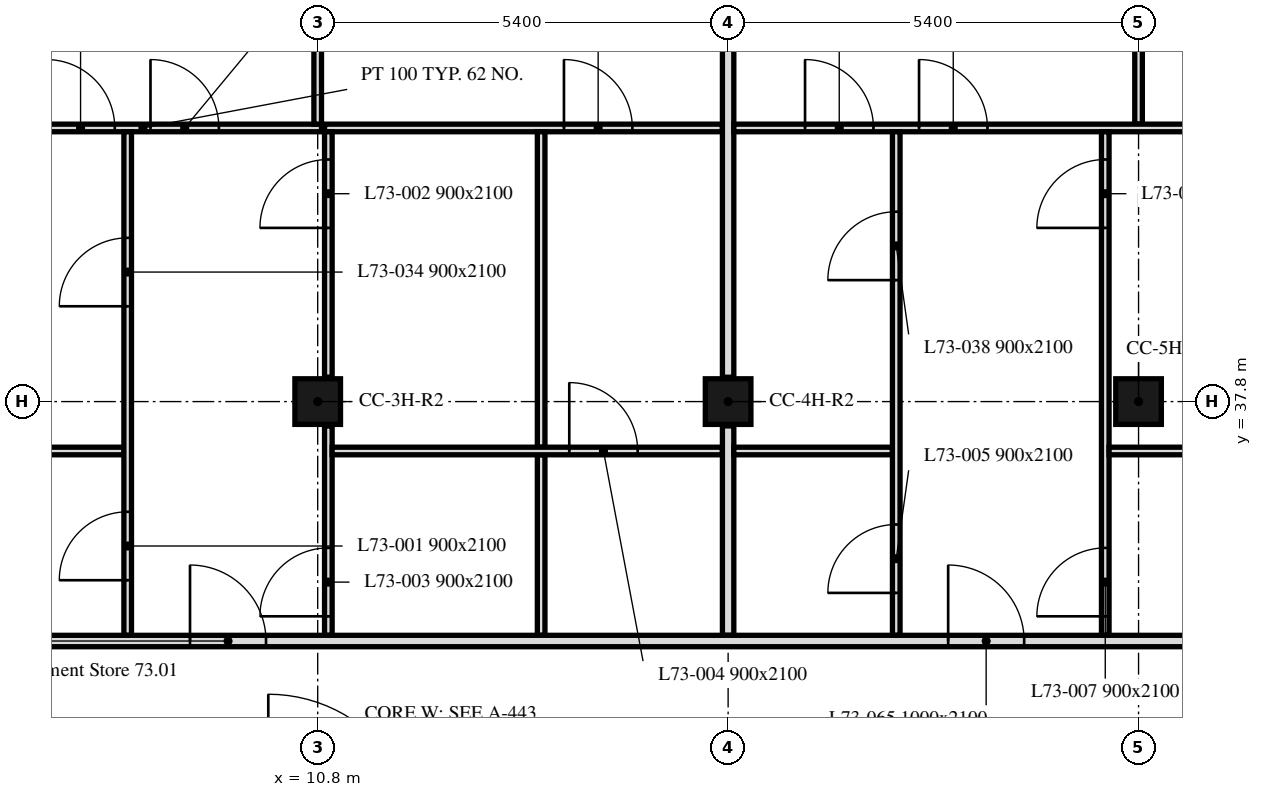
"""IFC4 building model, lengths in metres.
Left out: names, types, materials, properties, quantities, classifications, styles, units other than length and angle.
Written with IfcOpenShell. Run it as: python <this file> out.ifc"""

import sys

from ifc_helpers import new_model, si_unit, direction, frame, frame_2d, origin, origin_2d, place, context, subcontext, project, spatial, rectangle, extrude, element, fill, save


model = new_model("IFC4")
c1 = context("Model", 3, precision=1e-05, world=origin(), true_north=direction((0.0, 1.0)))
c2 = subcontext(c1, "Body", "Model", "MODEL_VIEW")
j1 = project(units=[si_unit("LENGTHUNIT", "METRE"), si_unit("PLANEANGLEUNIT", "RADIAN")], contexts=[c1])
p1 = place(None, origin())
s1 = spatial("IfcSite", under=j1, at=p1, CompositionType="ELEMENT")
p2 = place(p1, origin())
s2 = spatial("IfcBuilding", under=s1, at=p2, CompositionType="ELEMENT")
p3 = place(p2, frame((0.0, 0.0, 295.0)))
s3 = spatial("IfcBuildingStorey", under=s2, at=p3, CompositionType="ELEMENT", Elevation=295.0)
for number, where, z_axis, x_axis in (
    (1, (10.8, 37.8, 0.0), (0.0, 0.0, 1.0), (1.0, 0.0, 0.0)),
    (2, (16.2, 37.8, 0.0), (0.0, 0.0, 1.0), (1.0, 0.0, 0.0)),
    (3, (21.6, 37.8, 0.0), (0.0, 0.0, 1.0), (1.0, 0.0, 0.0)),
):
    element("IfcColumn", number, at=place(p3, frame(where, z_axis=z_axis, x_axis=x_axis)), inside=s3, PredefinedType="COLUMN", context=c2, shape_type="SweptSolid", body=[
        extrude(rectangle(XDim=0.6, YDim=0.6, at=origin_2d()), origin(), (0.0, 0.0, 1.0), 3.0),
    ])
p4 = place(p3, frame((6.151, 41.4, 0.0), z_axis=(0.0, 0.0, 1.0), x_axis=(1.0, 0.0, 0.0)))
e4 = element("IfcWall", 4, at=p4, inside=s3, PredefinedType="PARTITIONING", context=c2, shape_type="SweptSolid", body=[
    extrude(rectangle(XDim=4.699, YDim=0.1, at=frame_2d((2.35, 0.0))), origin(), (0.0, 0.0, 1.0), 3.0),
])
p5 = place(p4, frame((1.079, 0.0, 0.0)))
e5 = element("IfcOpeningElement", 5, at=p5, cuts=e4, PredefinedType="OPENING", context=c2, shape_type="SweptSolid", body=[
    extrude(rectangle(XDim=0.9, YDim=2.1, at=frame_2d((0.45, 1.05))), frame((0.0, 0.05, 0.0), z_axis=(0.0, -1.0, 0.0), x_axis=(1.0, 0.0, 0.0)), (0.0, 0.0, 1.0), 0.1),
])
p6 = place(p4, frame((2.449, 0.0, 0.0)))
e6 = element("IfcOpeningElement", 6, at=p6, cuts=e4, PredefinedType="OPENING", context=c2, shape_type="SweptSolid", body=[
    extrude(rectangle(XDim=0.9, YDim=2.1, at=frame_2d((0.45, 1.05))), frame((0.0, 0.05, 0.0), z_axis=(0.0, -1.0, 0.0), x_axis=(1.0, 0.0, 0.0)), (0.0, 0.0, 1.0), 0.1),
])
p7 = place(p3, frame((10.8, 41.45, 0.0), z_axis=(0.0, 0.0, 1.0), x_axis=(0.0, 1.0, 0.0)))
e7 = element("IfcWall", 7, at=p7, inside=s3, PredefinedType="PARTITIONING", context=c2, shape_type="SweptSolid", body=[
    extrude(rectangle(XDim=1.43, YDim=0.1, at=frame_2d((0.715, 0.0))), origin(), (0.0, 0.0, 1.0), 3.0),
])
p8 = place(p3, frame((10.89, 41.4, 0.0), z_axis=(0.0, 0.0, 1.0), x_axis=(1.0, 0.0, 0.0)))
e8 = element("IfcWall", 8, at=p8, inside=s3, PredefinedType="PARTITIONING", context=c2, shape_type="SweptSolid", body=[
    extrude(rectangle(XDim=5.235, YDim=0.1, at=frame_2d((2.618, 0.0))), origin(), (0.0, 0.0, 1.0), 3.0),
])
p9 = place(p8, frame((3.15, 0.0, 0.0)))
e9 = element("IfcOpeningElement", 9, at=p9, cuts=e8, PredefinedType="OPENING", context=c2, shape_type="SweptSolid", body=[
    extrude(rectangle(XDim=0.9, YDim=2.1, at=frame_2d((0.45, 1.05))), frame((0.0, 0.05, 0.0), z_axis=(0.0, -1.0, 0.0), x_axis=(1.0, 0.0, 0.0)), (0.0, 0.0, 1.0), 0.1),
])
p10 = place(p3, frame((6.151, 37.15, 0.0), z_axis=(0.0, 0.0, 1.0), x_axis=(1.0, 0.0, 0.0)))
e10 = element("IfcWall", 10, at=p10, inside=s3, PredefinedType="PARTITIONING", context=c2, shape_type="SweptSolid", body=[
    extrude(rectangle(XDim=2.099, YDim=0.1, at=frame_2d((1.05, 0.0))), origin(), (0.0, 0.0, 1.0), 3.0),
])
p11 = place(p3, frame((8.3, 34.725, 0.0), z_axis=(0.0, 0.0, 1.0), x_axis=(0.0, 1.0, 0.0)))
e11 = element("IfcWall", 11, at=p11, inside=s3, PredefinedType="PARTITIONING", context=c2, shape_type="SweptSolid", body=[
    extrude(rectangle(XDim=6.625, YDim=0.1, at=frame_2d((3.312, 0.0))), origin(), (0.0, 0.0, 1.0), 3.0),
])
p12 = place(p11, frame((0.725, 0.0, 0.0)))
e12 = element("IfcOpeningElement", 12, at=p12, cuts=e11, PredefinedType="OPENING", context=c2, shape_type="SweptSolid", body=[
    extrude(rectangle(XDim=0.9, YDim=2.1, at=frame_2d((0.45, 1.05))), frame((0.0, 0.05, 0.0), z_axis=(0.0, -1.0, 0.0), x_axis=(1.0, 0.0, 0.0)), (0.0, 0.0, 1.0), 0.1),
])
p13 = place(p11, frame((4.329, 0.0, 0.0)))
e13 = element("IfcOpeningElement", 13, at=p13, cuts=e11, PredefinedType="OPENING", context=c2, shape_type="SweptSolid", body=[
    extrude(rectangle(XDim=0.9, YDim=2.1, at=frame_2d((0.45, 1.05))), frame((0.0, 0.05, 0.0), z_axis=(0.0, -1.0, 0.0), x_axis=(1.0, 0.0, 0.0)), (0.0, 0.0, 1.0), 0.1),
])
p14 = place(p3, frame((10.94, 34.725, 0.0), z_axis=(0.0, 0.0, 1.0), x_axis=(0.0, 1.0, 0.0)))
e14 = element("IfcWall", 14, at=p14, inside=s3, PredefinedType="PARTITIONING", context=c2, shape_type="SweptSolid", body=[
    extrude(rectangle(XDim=2.755, YDim=0.1, at=frame_2d((1.377, 0.0))), origin(), (0.0, 0.0, 1.0), 3.0),
])
p15 = place(p14, frame((0.25, 0.0, 0.0)))
e15 = element("IfcOpeningElement", 15, at=p15, cuts=e14, PredefinedType="OPENING", context=c2, shape_type="SweptSolid", body=[
    extrude(rectangle(XDim=0.9, YDim=2.1, at=frame_2d((0.45, 1.05))), frame((0.0, 0.05, 0.0), z_axis=(0.0, -1.0, 0.0), x_axis=(1.0, 0.0, 0.0)), (0.0, 0.0, 1.0), 0.1),
])
p16 = place(p3, frame((10.94, 38.12, 0.0), z_axis=(0.0, 0.0, 1.0), x_axis=(0.0, 1.0, 0.0)))
e16 = element("IfcWall", 16, at=p16, inside=s3, PredefinedType="PARTITIONING", context=c2, shape_type="SweptSolid", body=[
    extrude(rectangle(XDim=3.23, YDim=0.1, at=frame_2d((1.615, 0.0))), origin(), (0.0, 0.0, 1.0), 3.0),
])
p17 = place(p16, frame((1.965, 0.0, 0.0)))
e17 = element("IfcOpeningElement", 17, at=p17, cuts=e16, PredefinedType="OPENING", context=c2, shape_type="SweptSolid", body=[
    extrude(rectangle(XDim=0.9, YDim=2.1, at=frame_2d((0.45, 1.05))), frame((0.0, 0.05, 0.0), z_axis=(0.0, -1.0, 0.0), x_axis=(1.0, 0.0, 0.0)), (0.0, 0.0, 1.0), 0.1),
])
p18 = place(p3, frame((13.74, 37.2, 0.0), z_axis=(0.0, 0.0, 1.0), x_axis=(0.0, 1.0, 0.0)))
e18 = element("IfcWall", 18, at=p18, inside=s3, PredefinedType="PARTITIONING", context=c2, shape_type="SweptSolid", body=[
    extrude(rectangle(XDim=4.15, YDim=0.1, at=frame_2d((2.075, 0.0))), origin(), (0.0, 0.0, 1.0), 3.0),
])
p19 = place(p3, frame((13.74, 34.725, 0.0), z_axis=(0.0, 0.0, 1.0), x_axis=(0.0, 1.0, 0.0)))
e19 = element("IfcWall", 19, at=p19, inside=s3, PredefinedType="PARTITIONING", context=c2, shape_type="SweptSolid", body=[
    extrude(rectangle(XDim=2.375, YDim=0.1, at=frame_2d((1.188, 0.0))), origin(), (0.0, 0.0, 1.0), 3.0),
])
p20 = place(p3, frame((10.99, 37.15, 0.0), z_axis=(0.0, 0.0, 1.0), x_axis=(1.0, 0.0, 0.0)))
e20 = element("IfcWall", 20, at=p20, inside=s3, PredefinedType="PARTITIONING", context=c2, shape_type="SweptSolid", body=[
    extrude(rectangle(XDim=5.135, YDim=0.1, at=frame_2d((2.567, 0.0))), origin(), (0.0, 0.0, 1.0), 3.0),
])
p21 = place(p20, frame((3.12, 0.0, 0.0)))
e21 = element("IfcOpeningElement", 21, at=p21, cuts=e20, PredefinedType="OPENING", context=c2, shape_type="SweptSolid", body=[
    extrude(rectangle(XDim=0.9, YDim=2.1, at=frame_2d((0.45, 1.05))), frame((0.0, 0.05, 0.0), z_axis=(0.0, -1.0, 0.0), x_axis=(1.0, 0.0, 0.0)), (0.0, 0.0, 1.0), 0.1),
])
p22 = place(p3, frame((16.2, 38.12, 0.0), z_axis=(0.0, 0.0, 1.0), x_axis=(0.0, 1.0, 0.0)))
e22 = element("IfcWall", 22, at=p22, inside=s3, PredefinedType="PARTITIONING", context=c2, shape_type="SweptSolid", body=[
    extrude(rectangle(XDim=4.76, YDim=0.15, at=frame_2d((2.38, 0.0))), origin(), (0.0, 0.0, 1.0), 2.4),
])
p23 = place(p3, frame((16.2, 34.725, 0.0), z_axis=(0.0, 0.0, 1.0), x_axis=(0.0, 1.0, 0.0)))
e23 = element("IfcWall", 23, at=p23, inside=s3, PredefinedType="PARTITIONING", context=c2, shape_type="SweptSolid", body=[
    extrude(rectangle(XDim=2.755, YDim=0.15, at=frame_2d((1.377, 0.0))), origin(), (0.0, 0.0, 1.0), 2.4),
])
p24 = place(p3, frame((21.6, 41.45, 0.0), z_axis=(0.0, 0.0, 1.0), x_axis=(0.0, 1.0, 0.0)))
e24 = element("IfcWall", 24, at=p24, inside=s3, PredefinedType="PARTITIONING", context=c2, shape_type="SweptSolid", body=[
    extrude(rectangle(XDim=1.43, YDim=0.1, at=frame_2d((0.715, 0.0))), origin(), (0.0, 0.0, 1.0), 2.4),
])
p25 = place(p3, frame((16.275, 41.4, 0.0), z_axis=(0.0, 0.0, 1.0), x_axis=(1.0, 0.0, 0.0)))
e25 = element("IfcWall", 25, at=p25, inside=s3, PredefinedType="PARTITIONING", context=c2, shape_type="SweptSolid", body=[
    extrude(rectangle(XDim=10.65, YDim=0.1, at=frame_2d((5.325, 0.0))), origin(), (0.0, 0.0, 1.0), 2.4),
])
p26 = place(p25, frame((0.937, 0.0, 0.0)))
e26 = element("IfcOpeningElement", 26, at=p26, cuts=e25, PredefinedType="OPENING", context=c2, shape_type="SweptSolid", body=[
    extrude(rectangle(XDim=0.9, YDim=2.1, at=frame_2d((0.45, 1.05))), frame((0.0, 0.05, 0.0), z_axis=(0.0, -1.0, 0.0), x_axis=(1.0, 0.0, 0.0)), (0.0, 0.0, 1.0), 0.1),
])
p27 = place(p25, frame((8.075, 0.0, 0.0)))
e27 = element("IfcOpeningElement", 27, at=p27, cuts=e25, PredefinedType="OPENING", context=c2, shape_type="SweptSolid", body=[
    extrude(rectangle(XDim=0.9, YDim=2.1, at=frame_2d((0.45, 1.05))), frame((0.0, 0.05, 0.0), z_axis=(0.0, -1.0, 0.0), x_axis=(1.0, 0.0, 0.0)), (0.0, 0.0, 1.0), 0.1),
])
p28 = place(p25, frame((2.437, 0.0, 0.0)))
e28 = element("IfcOpeningElement", 28, at=p28, cuts=e25, PredefinedType="OPENING", context=c2, shape_type="SweptSolid", body=[
    extrude(rectangle(XDim=0.9, YDim=2.1, at=frame_2d((0.45, 1.05))), frame((0.0, 0.05, 0.0), z_axis=(0.0, -1.0, 0.0), x_axis=(1.0, 0.0, 0.0)), (0.0, 0.0, 1.0), 0.1),
])
p29 = place(p3, frame((16.275, 37.15, 0.0), z_axis=(0.0, 0.0, 1.0), x_axis=(1.0, 0.0, 0.0)))
e29 = element("IfcWall", 29, at=p29, inside=s3, PredefinedType="PARTITIONING", context=c2, shape_type="SweptSolid", body=[
    extrude(rectangle(XDim=2.087, YDim=0.1, at=frame_2d((1.043, 0.0))), origin(), (0.0, 0.0, 1.0), 3.0),
])
p30 = place(p3, frame((18.412, 34.725, 0.0), z_axis=(0.0, 0.0, 1.0), x_axis=(0.0, 1.0, 0.0)))
e30 = element("IfcWall", 30, at=p30, inside=s3, PredefinedType="PARTITIONING", context=c2, shape_type="SweptSolid", body=[
    extrude(rectangle(XDim=6.625, YDim=0.1, at=frame_2d((3.312, 0.0))), origin(), (0.0, 0.0, 1.0), 3.0),
])
p31 = place(p30, frame((0.558, 0.0, 0.0)))
e31 = element("IfcOpeningElement", 31, at=p31, cuts=e30, PredefinedType="OPENING", context=c2, shape_type="SweptSolid", body=[
    extrude(rectangle(XDim=0.9, YDim=2.1, at=frame_2d((0.45, 1.05))), frame((0.0, 0.05, 0.0), z_axis=(0.0, -1.0, 0.0), x_axis=(1.0, 0.0, 0.0)), (0.0, 0.0, 1.0), 0.1),
])
p32 = place(p30, frame((4.673, 0.0, 0.0)))
e32 = element("IfcOpeningElement", 32, at=p32, cuts=e30, PredefinedType="OPENING", context=c2, shape_type="SweptSolid", body=[
    extrude(rectangle(XDim=0.9, YDim=2.1, at=frame_2d((0.45, 1.05))), frame((0.0, 0.05, 0.0), z_axis=(0.0, -1.0, 0.0), x_axis=(1.0, 0.0, 0.0)), (0.0, 0.0, 1.0), 0.1),
])
p33 = place(p3, frame((21.162, 34.725, 0.0), z_axis=(0.0, 0.0, 1.0), x_axis=(0.0, 1.0, 0.0)))
e33 = element("IfcWall", 33, at=p33, inside=s3, PredefinedType="PARTITIONING", context=c2, shape_type="SweptSolid", body=[
    extrude(rectangle(XDim=6.625, YDim=0.1, at=frame_2d((3.312, 0.0))), origin(), (0.0, 0.0, 1.0), 3.0),
])
p34 = place(p33, frame((5.36, 0.0, 0.0)))
e34 = element("IfcOpeningElement", 34, at=p34, cuts=e33, PredefinedType="OPENING", context=c2, shape_type="SweptSolid", body=[
    extrude(rectangle(XDim=0.9, YDim=2.1, at=frame_2d((0.45, 1.05))), frame((0.0, 0.05, 0.0), z_axis=(0.0, -1.0, 0.0), x_axis=(1.0, 0.0, 0.0)), (0.0, 0.0, 1.0), 0.1),
])
p35 = place(p33, frame((0.25, 0.0, 0.0)))
e35 = element("IfcOpeningElement", 35, at=p35, cuts=e33, PredefinedType="OPENING", context=c2, shape_type="SweptSolid", body=[
    extrude(rectangle(XDim=0.9, YDim=2.1, at=frame_2d((0.45, 1.05))), frame((0.0, 0.05, 0.0), z_axis=(0.0, -1.0, 0.0), x_axis=(1.0, 0.0, 0.0)), (0.0, 0.0, 1.0), 0.1),
])
p36 = place(p3, frame((21.212, 37.15, 0.0), z_axis=(0.0, 0.0, 1.0), x_axis=(1.0, 0.0, 0.0)))
e36 = element("IfcWall", 36, at=p36, inside=s3, PredefinedType="PARTITIONING", context=c2, shape_type="SweptSolid", body=[
    extrude(rectangle(XDim=5.713, YDim=0.1, at=frame_2d((2.856, 0.0))), origin(), (0.0, 0.0, 1.0), 2.4),
])
p37 = place(p36, frame((3.138, 0.0, 0.0)))
e37 = element("IfcOpeningElement", 37, at=p37, cuts=e36, PredefinedType="OPENING", context=c2, shape_type="SweptSolid", body=[
    extrude(rectangle(XDim=0.9, YDim=2.1, at=frame_2d((0.45, 1.05))), frame((0.0, 0.05, 0.0), z_axis=(0.0, -1.0, 0.0), x_axis=(1.0, 0.0, 0.0)), (0.0, 0.0, 1.0), 0.1),
])
p38 = place(p3, frame((6.151, 34.65, 0.0), z_axis=(0.0, 0.0, 1.0), x_axis=(1.0, 0.0, 0.0)))
e38 = element("IfcWall", 38, at=p38, inside=s3, PredefinedType="PARTITIONING", context=c2, shape_type="SweptSolid", body=[
    extrude(rectangle(XDim=41.698, YDim=0.15, at=frame_2d((20.849, 0.0))), origin(), (0.0, 0.0, 1.0), 2.4),
])
p39 = place(p38, frame((2.969, 0.0, 0.0)))
e39 = element("IfcOpeningElement", 39, at=p39, cuts=e38, PredefinedType="OPENING", context=c2, shape_type="SweptSolid", body=[
    extrude(rectangle(XDim=1.0, YDim=2.1, at=frame_2d((0.5, 1.05))), frame((0.0, 0.075, 0.0), z_axis=(0.0, -1.0, 0.0), x_axis=(1.0, 0.0, 0.0)), (0.0, 0.0, 1.0), 0.15),
])
p40 = place(p38, frame((12.944, 0.0, 0.0)))
e40 = element("IfcOpeningElement", 40, at=p40, cuts=e38, PredefinedType="OPENING", context=c2, shape_type="SweptSolid", body=[
    extrude(rectangle(XDim=1.0, YDim=2.1, at=frame_2d((0.5, 1.05))), frame((0.0, 0.075, 0.0), z_axis=(0.0, -1.0, 0.0), x_axis=(1.0, 0.0, 0.0)), (0.0, 0.0, 1.0), 0.15),
])
p41 = place(p38, frame((24.444, 0.0, 0.0)))
e41 = element("IfcOpeningElement", 41, at=p41, cuts=e38, PredefinedType="OPENING", context=c2, shape_type="SweptSolid", body=[
    extrude(rectangle(XDim=1.0, YDim=2.1, at=frame_2d((0.5, 1.05))), frame((0.0, 0.075, 0.0), z_axis=(0.0, -1.0, 0.0), x_axis=(1.0, 0.0, 0.0)), (0.0, 0.0, 1.0), 0.15),
])
p42 = place(p38, frame((34.964, 0.0, 0.0)))
e42 = element("IfcOpeningElement", 42, at=p42, cuts=e38, PredefinedType="OPENING", context=c2, shape_type="SweptSolid", body=[
    extrude(rectangle(XDim=1.0, YDim=2.1, at=frame_2d((0.5, 1.05))), frame((0.0, 0.075, 0.0), z_axis=(0.0, -1.0, 0.0), x_axis=(1.0, 0.0, 0.0)), (0.0, 0.0, 1.0), 0.15),
])
p43 = place(p12, origin())
e43 = element("IfcDoor", 43, at=p43, inside=s3, OperationType="SINGLE_SWING_LEFT", PredefinedType="DOOR", context=c2, shape_type="SweptSolid", body=[
    extrude(rectangle(XDim=0.9, YDim=2.1, at=frame_2d((0.45, 1.05))), frame((0.0, 0.025, 0.0), z_axis=(0.0, -1.0, 0.0), x_axis=(1.0, 0.0, 0.0)), (0.0, 0.0, 1.0), 0.05),
])
fill(e12, e43)
p44 = place(p17, origin())
e44 = element("IfcDoor", 44, at=p44, inside=s3, OperationType="SINGLE_SWING_RIGHT", PredefinedType="DOOR", context=c2, shape_type="SweptSolid", body=[
    extrude(rectangle(XDim=0.9, YDim=2.1, at=frame_2d((0.45, 1.05))), frame((0.0, 0.025, 0.0), z_axis=(0.0, -1.0, 0.0), x_axis=(1.0, 0.0, 0.0)), (0.0, 0.0, 1.0), 0.05),
])
fill(e17, e44)
p45 = place(p15, origin())
e45 = element("IfcDoor", 45, at=p45, inside=s3, OperationType="SINGLE_SWING_RIGHT", PredefinedType="DOOR", context=c2, shape_type="SweptSolid", body=[
    extrude(rectangle(XDim=0.9, YDim=2.1, at=frame_2d((0.45, 1.05))), frame((0.0, 0.025, 0.0), z_axis=(0.0, -1.0, 0.0), x_axis=(1.0, 0.0, 0.0)), (0.0, 0.0, 1.0), 0.05),
])
fill(e15, e45)
p46 = place(p21, origin())
e46 = element("IfcDoor", 46, at=p46, inside=s3, OperationType="SINGLE_SWING_RIGHT", PredefinedType="DOOR", context=c2, shape_type="SweptSolid", body=[
    extrude(rectangle(XDim=0.9, YDim=2.1, at=frame_2d((0.45, 1.05))), frame((0.0, 0.025, 0.0), z_axis=(0.0, -1.0, 0.0), x_axis=(1.0, 0.0, 0.0)), (0.0, 0.0, 1.0), 0.05),
])
fill(e21, e46)
p47 = place(p31, origin())
e47 = element("IfcDoor", 47, at=p47, inside=s3, OperationType="SINGLE_SWING_RIGHT", PredefinedType="DOOR", context=c2, shape_type="SweptSolid", body=[
    extrude(rectangle(XDim=0.9, YDim=2.1, at=frame_2d((0.45, 1.05))), frame((0.0, 0.025, 0.0), z_axis=(0.0, -1.0, 0.0), x_axis=(1.0, 0.0, 0.0)), (0.0, 0.0, 1.0), 0.05),
])
fill(e31, e47)
p48 = place(p34, origin())
e48 = element("IfcDoor", 48, at=p48, inside=s3, OperationType="SINGLE_SWING_LEFT", PredefinedType="DOOR", context=c2, shape_type="SweptSolid", body=[
    extrude(rectangle(XDim=0.9, YDim=2.1, at=frame_2d((0.45, 1.05))), frame((0.0, 0.025, 0.0), z_axis=(0.0, -1.0, 0.0), x_axis=(1.0, 0.0, 0.0)), (0.0, 0.0, 1.0), 0.05),
])
fill(e34, e48)
p49 = place(p35, origin())
e49 = element("IfcDoor", 49, at=p49, inside=s3, OperationType="SINGLE_SWING_LEFT", PredefinedType="DOOR", context=c2, shape_type="SweptSolid", body=[
    extrude(rectangle(XDim=0.9, YDim=2.1, at=frame_2d((0.45, 1.05))), frame((0.0, 0.025, 0.0), z_axis=(0.0, -1.0, 0.0), x_axis=(1.0, 0.0, 0.0)), (0.0, 0.0, 1.0), 0.05),
])
fill(e35, e49)
p50 = place(p5, origin())
e50 = element("IfcDoor", 50, at=p50, inside=s3, OperationType="SINGLE_SWING_RIGHT", PredefinedType="DOOR", context=c2, shape_type="SweptSolid", body=[
    extrude(rectangle(XDim=0.9, YDim=2.1, at=frame_2d((0.45, 1.05))), frame((0.0, 0.025, 0.0), z_axis=(0.0, -1.0, 0.0), x_axis=(1.0, 0.0, 0.0)), (0.0, 0.0, 1.0), 0.05),
])
fill(e5, e50)
p51 = place(p9, origin())
e51 = element("IfcDoor", 51, at=p51, inside=s3, OperationType="SINGLE_SWING_LEFT", PredefinedType="DOOR", context=c2, shape_type="SweptSolid", body=[
    extrude(rectangle(XDim=0.9, YDim=2.1, at=frame_2d((0.45, 1.05))), frame((0.0, 0.025, 0.0), z_axis=(0.0, -1.0, 0.0), x_axis=(1.0, 0.0, 0.0)), (0.0, 0.0, 1.0), 0.05),
])
fill(e9, e51)
p52 = place(p13, origin())
e52 = element("IfcDoor", 52, at=p52, inside=s3, OperationType="SINGLE_SWING_RIGHT", PredefinedType="DOOR", context=c2, shape_type="SweptSolid", body=[
    extrude(rectangle(XDim=0.9, YDim=2.1, at=frame_2d((0.45, 1.05))), frame((0.0, 0.025, 0.0), z_axis=(0.0, -1.0, 0.0), x_axis=(1.0, 0.0, 0.0)), (0.0, 0.0, 1.0), 0.05),
])
fill(e13, e52)
p53 = place(p26, origin())
e53 = element("IfcDoor", 53, at=p53, inside=s3, OperationType="SINGLE_SWING_RIGHT", PredefinedType="DOOR", context=c2, shape_type="SweptSolid", body=[
    extrude(rectangle(XDim=0.9, YDim=2.1, at=frame_2d((0.45, 1.05))), frame((0.0, 0.025, 0.0), z_axis=(0.0, -1.0, 0.0), x_axis=(1.0, 0.0, 0.0)), (0.0, 0.0, 1.0), 0.05),
])
fill(e26, e53)
p54 = place(p32, origin())
e54 = element("IfcDoor", 54, at=p54, inside=s3, OperationType="SINGLE_SWING_LEFT", PredefinedType="DOOR", context=c2, shape_type="SweptSolid", body=[
    extrude(rectangle(XDim=0.9, YDim=2.1, at=frame_2d((0.45, 1.05))), frame((0.0, 0.025, 0.0), z_axis=(0.0, -1.0, 0.0), x_axis=(1.0, 0.0, 0.0)), (0.0, 0.0, 1.0), 0.05),
])
fill(e32, e54)
p55 = place(p6, origin())
e55 = element("IfcDoor", 55, at=p55, inside=s3, OperationType="SINGLE_SWING_LEFT", PredefinedType="DOOR", context=c2, shape_type="SweptSolid", body=[
    extrude(rectangle(XDim=0.9, YDim=2.1, at=frame_2d((0.45, 1.05))), frame((0.0, 0.025, 0.0), z_axis=(0.0, -1.0, 0.0), x_axis=(1.0, 0.0, 0.0)), (0.0, 0.0, 1.0), 0.05),
])
fill(e6, e55)
p56 = place(p28, origin())
e56 = element("IfcDoor", 56, at=p56, inside=s3, OperationType="SINGLE_SWING_LEFT", PredefinedType="DOOR", context=c2, shape_type="SweptSolid", body=[
    extrude(rectangle(XDim=0.9, YDim=2.1, at=frame_2d((0.45, 1.05))), frame((0.0, 0.025, 0.0), z_axis=(0.0, -1.0, 0.0), x_axis=(1.0, 0.0, 0.0)), (0.0, 0.0, 1.0), 0.05),
])
fill(e28, e56)
p57 = place(p39, origin())
e57 = element("IfcDoor", 57, at=p57, inside=s3, OperationType="SINGLE_SWING_RIGHT", PredefinedType="DOOR", context=c2, shape_type="SweptSolid", body=[
    extrude(rectangle(XDim=1.0, YDim=2.1, at=frame_2d((0.5, 1.05))), frame((0.0, 0.025, 0.0), z_axis=(0.0, -1.0, 0.0), x_axis=(1.0, 0.0, 0.0)), (0.0, 0.0, 1.0), 0.05),
])
fill(e39, e57)
p58 = place(p40, origin())
e58 = element("IfcDoor", 58, at=p58, inside=s3, OperationType="SINGLE_SWING_RIGHT", PredefinedType="DOOR", context=c2, shape_type="SweptSolid", body=[
    extrude(rectangle(XDim=1.0, YDim=2.1, at=frame_2d((0.5, 1.05))), frame((0.0, 0.025, 0.0), z_axis=(0.0, -1.0, 0.0), x_axis=(1.0, 0.0, 0.0)), (0.0, 0.0, 1.0), 0.05),
])
fill(e40, e58)
save(model, sys.argv[1])
